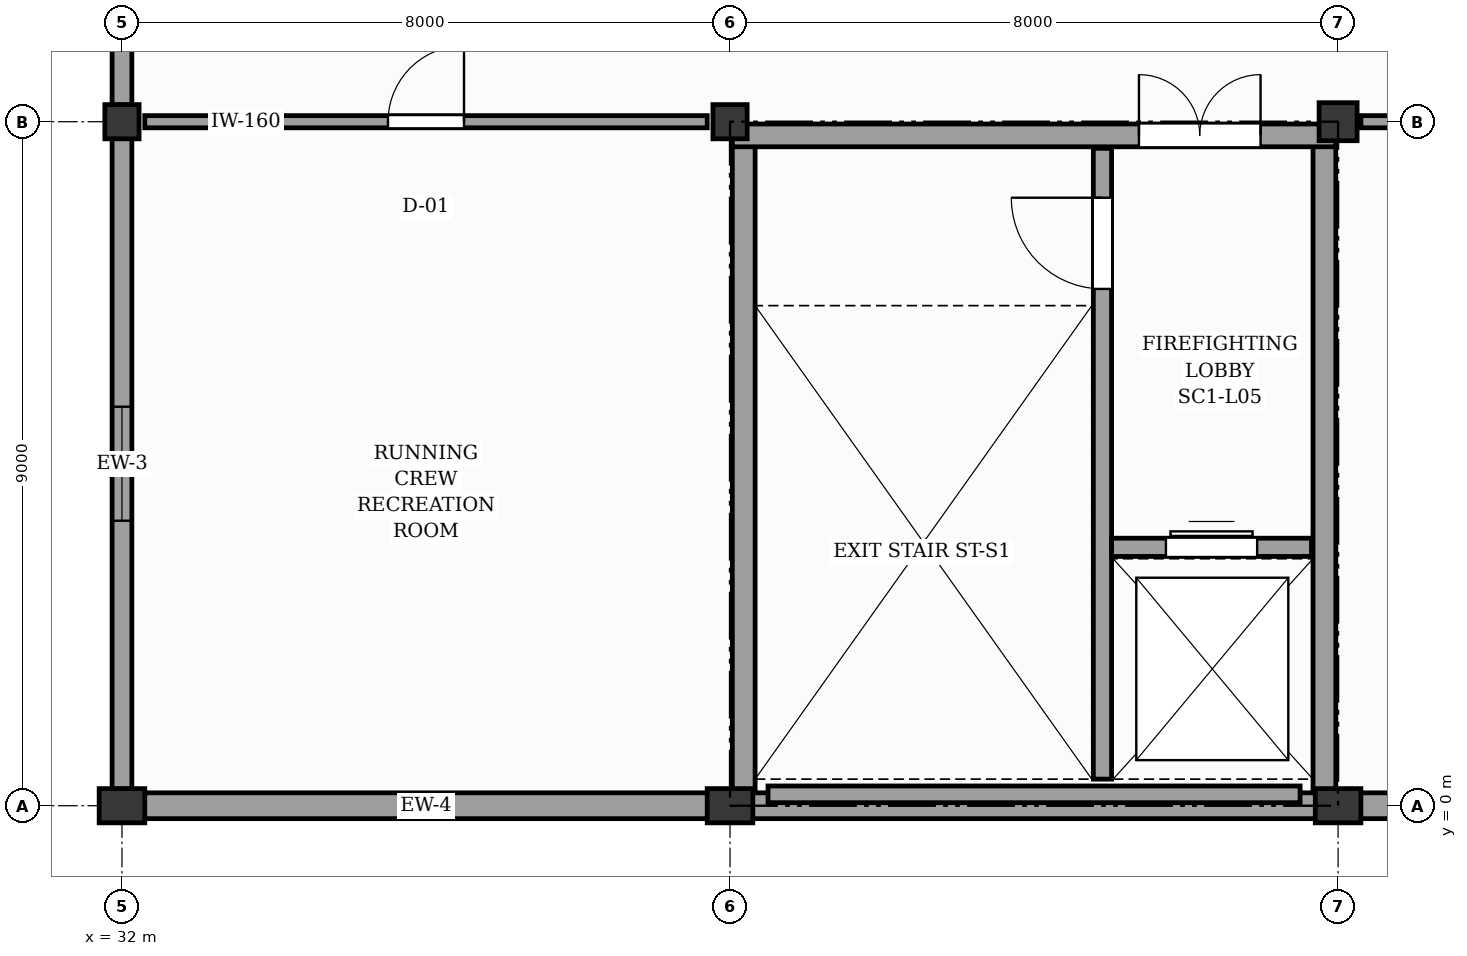
"""IFC4 building model, lengths in metres.
Left out: names, types, materials, properties, quantities, classifications, styles, units other than length and angle.
Written with IfcOpenShell. Run it as: python <this file> out.ifc"""

import sys

from ifc_helpers import new_model, si_unit, direction, frame, frame_2d, origin, origin_2d, place, context, subcontext, project, spatial, rectangle, extrude, element, fill, save


model = new_model("IFC4")
c1 = context("Model", 3, precision=1e-05, world=origin(), true_north=direction((0.0, 1.0)))
c2 = subcontext(c1, "Body", "Model", "MODEL_VIEW")
j1 = project(units=[si_unit("LENGTHUNIT", "METRE"), si_unit("PLANEANGLEUNIT", "RADIAN")], contexts=[c1])
p1 = place(None, origin())
s1 = spatial("IfcSite", under=j1, at=p1, CompositionType="ELEMENT")
p2 = place(p1, origin())
s2 = spatial("IfcBuilding", under=s1, at=p2, CompositionType="ELEMENT")
p3 = place(p2, frame((0.0, 0.0, 24.6)))
s3 = spatial("IfcBuildingStorey", under=s2, at=p3, CompositionType="ELEMENT", Elevation=24.6)
p4 = place(p3, frame((32.0, 0.0, 0.0), z_axis=(0.0, 0.0, 1.0), x_axis=(1.0, 0.0, 0.0)))
e1 = element("IfcColumn", 1, at=p4, inside=s3, PredefinedType="PILASTER", context=c2, shape_type="SweptSolid", body=[
    extrude(rectangle(XDim=0.6, YDim=0.45, at=origin_2d()), origin(), (0.0, 0.0, 1.0), 4.2),
])
p5 = place(p3, frame((32.0, 9.0, 0.0), z_axis=(0.0, 0.0, 1.0), x_axis=(1.0, 0.0, 0.0)))
e2 = element("IfcColumn", 2, at=p5, inside=s3, PredefinedType="COLUMN", context=c2, shape_type="SweptSolid", body=[
    extrude(rectangle(XDim=0.45, YDim=0.45, at=origin_2d()), origin(), (0.0, 0.0, 1.0), 4.2),
])
p6 = place(p3, frame((40.0, 0.0, 0.0), z_axis=(0.0, 0.0, 1.0), x_axis=(1.0, 0.0, 0.0)))
e3 = element("IfcColumn", 3, at=p6, inside=s3, PredefinedType="PILASTER", context=c2, shape_type="SweptSolid", body=[
    extrude(rectangle(XDim=0.6, YDim=0.45, at=origin_2d()), origin(), (0.0, 0.0, 1.0), 4.2),
])
p7 = place(p3, frame((40.0, 9.0, 0.0), z_axis=(0.0, 0.0, 1.0), x_axis=(1.0, 0.0, 0.0)))
e4 = element("IfcColumn", 4, at=p7, inside=s3, PredefinedType="COLUMN", context=c2, shape_type="SweptSolid", body=[
    extrude(rectangle(XDim=0.45, YDim=0.45, at=origin_2d()), origin(), (0.0, 0.0, 1.0), 4.2),
])
p8 = place(p3, frame((48.0, 0.0, 0.0), z_axis=(0.0, 0.0, 1.0), x_axis=(1.0, 0.0, 0.0)))
e5 = element("IfcColumn", 5, at=p8, inside=s3, PredefinedType="PILASTER", context=c2, shape_type="SweptSolid", body=[
    extrude(rectangle(XDim=0.6, YDim=0.45, at=origin_2d()), origin(), (0.0, 0.0, 1.0), 4.2),
])
p9 = place(p3, frame((48.0, 9.0, 0.0), z_axis=(0.0, 0.0, 1.0), x_axis=(1.0, 0.0, 0.0)))
e6 = element("IfcColumn", 6, at=p9, inside=s3, PredefinedType="COLUMN", context=c2, shape_type="SweptSolid", body=[
    extrude(rectangle(XDim=0.5, YDim=0.5, at=origin_2d()), origin(), (0.0, 0.0, 1.0), 4.2),
])
for number, where, z_axis, x_axis in (
    (7, (32.295, 0.0, 0.0), (0.0, 0.0, 1.0), (1.0, 0.0, 0.0)),
    (8, (40.295, 0.0, 0.0), (0.0, 0.0, 1.0), (1.0, 0.0, 0.0)),
    (9, (48.295, 0.0, 0.0), (0.0, 0.0, 1.0), (1.0, 0.0, 0.0)),
):
    element("IfcWall", number, at=place(p3, frame(where, z_axis=z_axis, x_axis=x_axis)), inside=s3, PredefinedType="SOLIDWALL", context=c2, shape_type="SweptSolid", body=[
        extrude(rectangle(XDim=7.41, YDim=0.34, at=frame_2d((3.705, 0.0))), origin(), (0.0, 0.0, 1.0), 3.24),
    ])
p10 = place(p3, frame((32.0, 0.22, 0.0), z_axis=(0.0, 0.0, 1.0), x_axis=(0.0, 1.0, 0.0)))
e10 = element("IfcWall", 10, at=p10, inside=s3, PredefinedType="SOLIDWALL", context=c2, shape_type="SweptSolid", body=[
    extrude(rectangle(XDim=8.56, YDim=0.26, at=frame_2d((4.28, 0.0))), origin(), (0.0, 0.0, 1.0), 3.24),
])
p11 = place(p10, frame((3.53, 0.0, 0.95)))
e11 = element("IfcOpeningElement", 11, at=p11, cuts=e10, PredefinedType="OPENING", context=c2, shape_type="SweptSolid", body=[
    extrude(rectangle(XDim=1.5, YDim=1.9, at=frame_2d((0.75, 0.95))), frame((0.0, 0.14, 0.0), z_axis=(0.0, -1.0, 0.0), x_axis=(1.0, 0.0, 0.0)), (0.0, 0.0, 1.0), 0.28),
])
p12 = place(p3, frame((32.0, 9.22, 0.0), z_axis=(0.0, 0.0, 1.0), x_axis=(0.0, 1.0, 0.0)))
e12 = element("IfcWall", 12, at=p12, inside=s3, PredefinedType="SOLIDWALL", context=c2, shape_type="SweptSolid", body=[
    extrude(rectangle(XDim=8.56, YDim=0.26, at=frame_2d((4.28, 0.0))), origin(), (0.0, 0.0, 1.0), 3.24),
])
p13 = place(p12, frame((3.53, 0.0, 0.95)))
e13 = element("IfcOpeningElement", 13, at=p13, cuts=e12, PredefinedType="OPENING", context=c2, shape_type="SweptSolid", body=[
    extrude(rectangle(XDim=1.5, YDim=1.9, at=frame_2d((0.75, 0.95))), frame((0.0, 0.14, 0.0), z_axis=(0.0, -1.0, 0.0), x_axis=(1.0, 0.0, 0.0)), (0.0, 0.0, 1.0), 0.28),
])
p14 = place(p3, frame((40.5, 0.15, 4.2), z_axis=(0.0, 0.0, 1.0), x_axis=(1.0, 0.0, 0.0)))
e14 = element("IfcWall", 14, at=p14, inside=s3, PredefinedType="PARAPET", context=c2, shape_type="SweptSolid", body=[
    extrude(rectangle(XDim=7.0, YDim=0.22, at=frame_2d((3.5, 0.0))), origin(), (0.0, 0.0, 1.0), 0.95),
])
p15 = place(p3, frame((44.9, 0.35, 0.0), z_axis=(0.0, 0.0, 1.0), x_axis=(0.0, 1.0, 0.0)))
e15 = element("IfcWall", 15, at=p15, inside=s3, PredefinedType="SHEAR", context=c2, shape_type="SweptSolid", body=[
    extrude(rectangle(XDim=8.3, YDim=0.24, at=frame_2d((4.15, 0.0))), origin(), (0.0, 0.0, 1.0), 3.98),
])
p16 = place(p15, frame((6.45, 0.0, 0.0)))
e16 = element("IfcOpeningElement", 16, at=p16, cuts=e15, PredefinedType="OPENING", context=c2, shape_type="SweptSolid", body=[
    extrude(rectangle(XDim=1.2, YDim=2.15, at=frame_2d((0.6, 1.075))), frame((0.0, 0.13, 0.0), z_axis=(0.0, -1.0, 0.0), x_axis=(1.0, 0.0, 0.0)), (0.0, 0.0, 1.0), 0.26),
])
p17 = place(p3, frame((45.02, 3.4, 0.0), z_axis=(0.0, 0.0, 1.0), x_axis=(1.0, 0.0, 0.0)))
e17 = element("IfcWall", 17, at=p17, inside=s3, PredefinedType="SHEAR", context=c2, shape_type="SweptSolid", body=[
    extrude(rectangle(XDim=2.63, YDim=0.24, at=frame_2d((1.315, 0.0))), origin(), (0.0, 0.0, 1.0), 3.98),
])
p18 = place(p17, frame((0.715, 0.0, 0.0)))
e18 = element("IfcOpeningElement", 18, at=p18, cuts=e17, PredefinedType="OPENING", context=c2, shape_type="SweptSolid", body=[
    extrude(rectangle(XDim=1.2, YDim=2.15, at=frame_2d((0.6, 1.075))), frame((0.0, 0.13, 0.0), z_axis=(0.0, -1.0, 0.0), x_axis=(1.0, 0.0, 0.0)), (0.0, 0.0, 1.0), 0.26),
])
for number, where, z_axis, x_axis in (
    (19, (40.18, 0.18, 0.0), (0.0, 0.0, 1.0), (0.0, 1.0, 0.0)),
    (20, (47.82, 0.18, 0.0), (0.0, 0.0, 1.0), (0.0, 1.0, 0.0)),
):
    element("IfcWall", number, at=place(p3, frame(where, z_axis=z_axis, x_axis=x_axis)), inside=s3, PredefinedType="SHEAR", context=c2, shape_type="SweptSolid", body=[
        extrude(rectangle(XDim=8.64, YDim=0.3, at=frame_2d((4.32, 0.0))), origin(), (0.0, 0.0, 1.0), 3.98),
    ])
p19 = place(p3, frame((40.03, 8.82, 0.0), z_axis=(0.0, 0.0, 1.0), x_axis=(1.0, 0.0, 0.0)))
e21 = element("IfcWall", 21, at=p19, inside=s3, PredefinedType="SHEAR", context=c2, shape_type="SweptSolid", body=[
    extrude(rectangle(XDim=7.94, YDim=0.3, at=frame_2d((3.97, 0.0))), origin(), (0.0, 0.0, 1.0), 3.98),
])
p20 = place(p19, frame((5.35, 0.0, 0.0)))
e22 = element("IfcOpeningElement", 22, at=p20, cuts=e21, PredefinedType="OPENING", context=c2, shape_type="SweptSolid", body=[
    extrude(rectangle(XDim=1.6, YDim=2.15, at=frame_2d((0.8, 1.075))), frame((0.0, 0.16, 0.0), z_axis=(0.0, -1.0, 0.0), x_axis=(1.0, 0.0, 0.0)), (0.0, 0.0, 1.0), 0.32),
])
p21 = place(p3, frame((32.3, 9.0, 0.0), z_axis=(0.0, 0.0, 1.0), x_axis=(1.0, 0.0, 0.0)))
e23 = element("IfcWall", 23, at=p21, inside=s3, PredefinedType="PARTITIONING", context=c2, shape_type="SweptSolid", body=[
    extrude(rectangle(XDim=7.4, YDim=0.16, at=frame_2d((3.7, 0.0))), origin(), (0.0, 0.0, 1.0), 3.1),
])
p22 = place(p21, frame((3.2, 0.0, 0.0)))
e24 = element("IfcOpeningElement", 24, at=p22, cuts=e23, PredefinedType="OPENING", context=c2, shape_type="SweptSolid", body=[
    extrude(rectangle(XDim=1.0, YDim=2.1, at=frame_2d((0.5, 1.05))), frame((0.0, 0.09, 0.0), z_axis=(0.0, -1.0, 0.0), x_axis=(1.0, 0.0, 0.0)), (0.0, 0.0, 1.0), 0.18),
])
p23 = place(p3, frame((48.3, 9.0, 0.0), z_axis=(0.0, 0.0, 1.0), x_axis=(1.0, 0.0, 0.0)))
e25 = element("IfcWall", 25, at=p23, inside=s3, PredefinedType="PARTITIONING", context=c2, shape_type="SweptSolid", body=[
    extrude(rectangle(XDim=7.4, YDim=0.16, at=frame_2d((3.7, 0.0))), origin(), (0.0, 0.0, 1.0), 3.1),
])
p24 = place(p23, frame((2.8, 0.0, 0.0)))
e26 = element("IfcOpeningElement", 26, at=p24, cuts=e25, PredefinedType="OPENING", context=c2, shape_type="SweptSolid", body=[
    extrude(rectangle(XDim=1.8, YDim=2.25, at=frame_2d((0.9, 1.125))), frame((0.0, 0.09, 0.0), z_axis=(0.0, -1.0, 0.0), x_axis=(1.0, 0.0, 0.0)), (0.0, 0.0, 1.0), 0.18),
])
p25 = place(p11, origin())
e27 = element("IfcWindow", 27, at=p25, inside=s3, PartitioningType="SINGLE_PANEL", PredefinedType="WINDOW", context=c2, shape_type="SweptSolid", body=[
    extrude(rectangle(XDim=1.5, YDim=1.9, at=frame_2d((0.75, 0.95))), frame((0.0, 0.03, 0.0), z_axis=(0.0, -1.0, 0.0), x_axis=(1.0, 0.0, 0.0)), (0.0, 0.0, 1.0), 0.06),
])
fill(e11, e27)
p26 = place(p16, origin())
e28 = element("IfcDoor", 28, at=p26, inside=s3, OperationType="SINGLE_SWING_RIGHT", PredefinedType="DOOR", context=c2, shape_type="SweptSolid", body=[
    extrude(rectangle(XDim=1.2, YDim=2.15, at=frame_2d((0.6, 1.075))), frame((0.0, 0.025, 0.0), z_axis=(0.0, -1.0, 0.0), x_axis=(1.0, 0.0, 0.0)), (0.0, 0.0, 1.0), 0.05),
])
fill(e16, e28)
p27 = place(p18, origin())
e29 = element("IfcDoor", 29, at=p27, inside=s3, OperationType="DOUBLE_DOOR_SLIDING", PredefinedType="DOOR", context=c2, shape_type="SweptSolid", body=[
    extrude(rectangle(XDim=1.2, YDim=2.15, at=frame_2d((0.6, 1.075))), frame((0.0, 0.025, 0.0), z_axis=(0.0, -1.0, 0.0), x_axis=(1.0, 0.0, 0.0)), (0.0, 0.0, 1.0), 0.05),
])
fill(e18, e29)
p28 = place(p20, origin())
e30 = element("IfcDoor", 30, at=p28, inside=s3, OperationType="DOUBLE_DOOR_SINGLE_SWING", PredefinedType="DOOR", context=c2, shape_type="SweptSolid", body=[
    extrude(rectangle(XDim=1.6, YDim=2.15, at=frame_2d((0.8, 1.075))), frame((0.0, 0.025, 0.0), z_axis=(0.0, -1.0, 0.0), x_axis=(1.0, 0.0, 0.0)), (0.0, 0.0, 1.0), 0.05),
])
fill(e22, e30)
p29 = place(p22, origin())
e31 = element("IfcDoor", 31, at=p29, inside=s3, OperationType="SINGLE_SWING_RIGHT", PredefinedType="DOOR", context=c2, shape_type="SweptSolid", body=[
    extrude(rectangle(XDim=1.0, YDim=2.1, at=frame_2d((0.5, 1.05))), frame((0.0, 0.025, 0.0), z_axis=(0.0, -1.0, 0.0), x_axis=(1.0, 0.0, 0.0)), (0.0, 0.0, 1.0), 0.05),
])
fill(e24, e31)
save(model, sys.argv[1])
